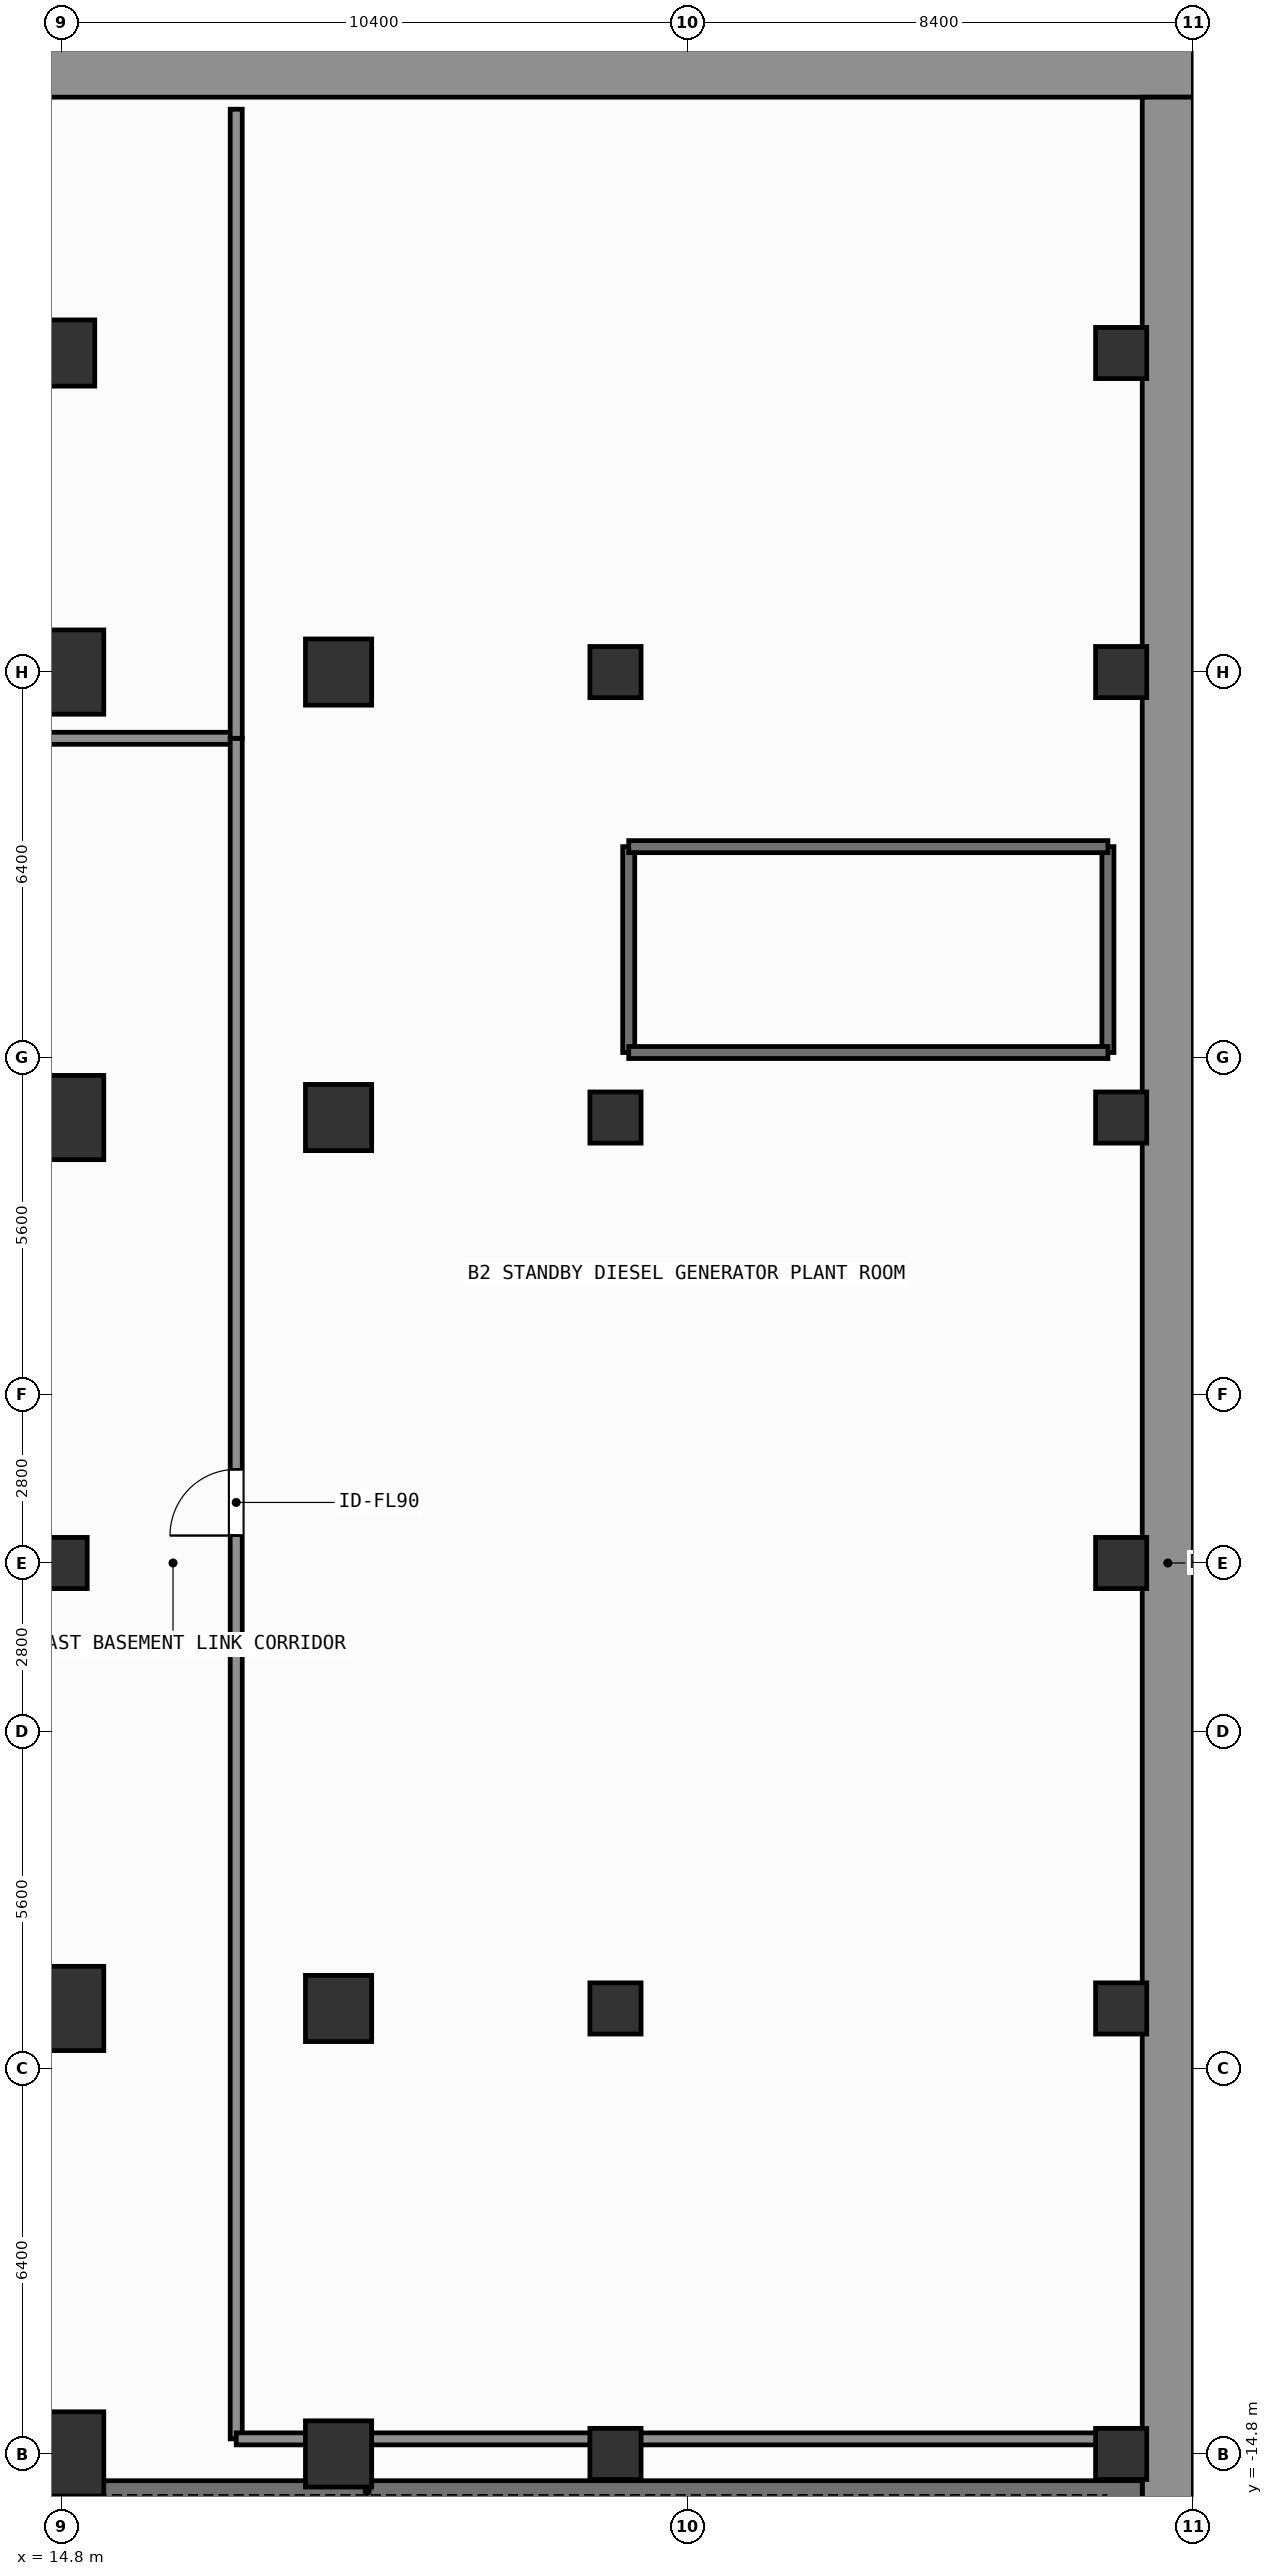
"""IFC4 building model, lengths in metres.
Left out: names, types, materials, properties, quantities, classifications, styles, units other than length and angle.
Written with IfcOpenShell. Run it as: python <this file> out.ifc"""

import sys

from ifc_helpers import new_model, si_unit, direction, frame, frame_2d, origin, origin_2d, place, context, subcontext, project, spatial, rectangle, extrude, element, fill, save


model = new_model("IFC4")
c1 = context("Model", 3, precision=1e-05, world=origin(), true_north=direction((0.0, 1.0)))
c2 = subcontext(c1, "Body", "Model", "MODEL_VIEW")
j1 = project(units=[si_unit("LENGTHUNIT", "METRE"), si_unit("PLANEANGLEUNIT", "RADIAN")], contexts=[c1])
p1 = place(None, origin())
s1 = spatial("IfcSite", under=j1, at=p1, CompositionType="ELEMENT")
p2 = place(p1, origin())
s2 = spatial("IfcBuilding", under=s1, at=p2, CompositionType="ELEMENT")
p3 = place(p2, frame((0.0, 0.0, -8.4)))
s3 = spatial("IfcBuildingStorey", under=s2, at=p3, CompositionType="ELEMENT", Elevation=-8.4)
p4 = place(p3, frame((-33.6, 24.775, 0.0), z_axis=(0.0, 0.0, 1.0), x_axis=(1.0, 0.0, 0.0)))
e1 = element("IfcWall", 1, at=p4, inside=s3, PredefinedType="SOLIDWALL", context=c2, shape_type="SweptSolid", body=[
    extrude(rectangle(XDim=67.2, YDim=0.85, at=frame_2d((33.6, 0.0))), origin(), (0.0, 0.0, 1.0), 4.2),
])
p5 = place(p3, frame((33.175, -24.35, 0.0), z_axis=(0.0, 0.0, 1.0), x_axis=(0.0, 1.0, 0.0)))
e2 = element("IfcWall", 2, at=p5, inside=s3, PredefinedType="SOLIDWALL", context=c2, shape_type="SweptSolid", body=[
    extrude(rectangle(XDim=48.7, YDim=0.85, at=frame_2d((24.35, 0.0))), origin(), (0.0, 0.0, 1.0), 4.2),
])
p6 = place(p3, frame((7.0, -15.42, 0.0), z_axis=(0.0, 0.0, 1.0), x_axis=(1.0, 0.0, 0.0)))
e3 = element("IfcWall", 3, at=p6, inside=s3, PredefinedType="SHEAR", context=c2, shape_type="SweptSolid", body=[
    extrude(rectangle(XDim=25.75, YDim=0.35, at=frame_2d((12.875, 0.0))), origin(), (0.0, 0.0, 1.0), 4.2),
])
for number, where, z_axis, x_axis in (
    (4, (14.8, -14.8, 0.0), (0.0, 0.0, 1.0), (1.0, 0.0, 0.0)),
    (5, (14.8, 14.8, 0.0), (0.0, 0.0, 1.0), (1.0, 0.0, 0.0)),
    (6, (14.8, -7.4, 0.0), (0.0, 0.0, 1.0), (1.0, 0.0, 0.0)),
    (7, (14.8, 7.4, 0.0), (0.0, 0.0, 1.0), (1.0, 0.0, 0.0)),
):
    element("IfcColumn", number, at=place(p3, frame(where, z_axis=z_axis, x_axis=x_axis)), inside=s3, PredefinedType="COLUMN", context=c2, shape_type="SweptSolid", body=[
        extrude(rectangle(XDim=1.4, YDim=1.4, at=origin_2d()), origin(), (0.0, 0.0, 1.0), 4.2),
    ])
for number, where, z_axis, x_axis in (
    (8, (19.4, -14.8, 0.0), (0.0, 0.0, 1.0), (1.0, 0.0, 0.0)),
    (9, (19.4, -7.4, 0.0), (0.0, 0.0, 1.0), (1.0, 0.0, 0.0)),
    (10, (19.4, 7.4, 0.0), (0.0, 0.0, 1.0), (1.0, 0.0, 0.0)),
    (11, (19.4, 14.8, 0.0), (0.0, 0.0, 1.0), (1.0, 0.0, 0.0)),
    (12, (14.8, 20.1, 0.0), (0.0, 0.0, 1.0), (1.0, 0.0, 0.0)),
):
    element("IfcColumn", number, at=place(p3, frame(where, z_axis=z_axis, x_axis=x_axis)), inside=s3, PredefinedType="COLUMN", context=c2, shape_type="SweptSolid", body=[
        extrude(rectangle(XDim=1.1, YDim=1.1, at=origin_2d()), origin(), (0.0, 0.0, 1.0), 4.2),
    ])
for number, where, z_axis, x_axis in (
    (13, (14.8, 0.0, 0.0), (0.0, 0.0, 1.0), (1.0, 0.0, 0.0)),
    (14, (24.0, -14.8, 0.0), (0.0, 0.0, 1.0), (1.0, 0.0, 0.0)),
    (15, (24.0, -7.4, 0.0), (0.0, 0.0, 1.0), (1.0, 0.0, 0.0)),
    (16, (24.0, 7.4, 0.0), (0.0, 0.0, 1.0), (1.0, 0.0, 0.0)),
    (17, (24.0, 14.8, 0.0), (0.0, 0.0, 1.0), (1.0, 0.0, 0.0)),
    (18, (32.4, -14.8, 0.0), (0.0, 0.0, 1.0), (1.0, 0.0, 0.0)),
    (19, (32.4, -7.4, 0.0), (0.0, 0.0, 1.0), (1.0, 0.0, 0.0)),
    (20, (32.4, 0.0, 0.0), (0.0, 0.0, 1.0), (1.0, 0.0, 0.0)),
    (21, (32.4, 7.4, 0.0), (0.0, 0.0, 1.0), (1.0, 0.0, 0.0)),
    (22, (32.4, 14.8, 0.0), (0.0, 0.0, 1.0), (1.0, 0.0, 0.0)),
    (23, (32.4, 20.1, 0.0), (0.0, 0.0, 1.0), (1.0, 0.0, 0.0)),
):
    element("IfcColumn", number, at=place(p3, frame(where, z_axis=z_axis, x_axis=x_axis)), inside=s3, PredefinedType="COLUMN", context=c2, shape_type="SweptSolid", body=[
        extrude(rectangle(XDim=0.85, YDim=0.85, at=origin_2d()), origin(), (0.0, 0.0, 1.0), 4.2),
    ])
for number, where, z_axis, x_axis in (
    (24, (24.22, 8.48, 0.0), (0.0, 0.0, 1.0), (0.0, 1.0, 0.0)),
    (25, (32.18, 11.9, 0.0), (0.0, 0.0, 1.0), (0.0, -1.0, 0.0)),
):
    element("IfcWall", number, at=place(p3, frame(where, z_axis=z_axis, x_axis=x_axis)), inside=s3, PredefinedType="SHEAR", context=c2, shape_type="SweptSolid", body=[
        extrude(rectangle(XDim=3.42, YDim=0.2, at=frame_2d((1.71, 0.0))), origin(), (0.0, 0.0, 1.0), 3.94),
    ])
for number, where, z_axis, x_axis in (
    (26, (32.18, 8.48, 0.0), (0.0, 0.0, 1.0), (-1.0, 0.0, 0.0)),
    (27, (24.22, 11.9, 0.0), (0.0, 0.0, 1.0), (1.0, 0.0, 0.0)),
):
    element("IfcWall", number, at=place(p3, frame(where, z_axis=z_axis, x_axis=x_axis)), inside=s3, PredefinedType="SHEAR", context=c2, shape_type="SweptSolid", body=[
        extrude(rectangle(XDim=7.96, YDim=0.2, at=frame_2d((3.98, 0.0))), origin(), (0.0, 0.0, 1.0), 3.94),
    ])
p7 = place(p3, frame((-13.6, 13.7, 0.0), z_axis=(0.0, 0.0, 1.0), x_axis=(1.0, 0.0, 0.0)))
e28 = element("IfcWall", 28, at=p7, inside=s3, PredefinedType="SOLIDWALL", context=c2, shape_type="SweptSolid", body=[
    extrude(rectangle(XDim=31.3, YDim=0.2, at=frame_2d((15.65, 0.0))), origin(), (0.0, 0.0, 1.0), 3.94),
])
p8 = place(p7, frame((14.38, 0.0, 0.0)))
e29 = element("IfcOpeningElement", 29, at=p8, cuts=e28, PredefinedType="OPENING", context=c2, shape_type="SweptSolid", body=[
    extrude(rectangle(XDim=1.1, YDim=2.15, at=frame_2d((0.55, 1.075))), frame((0.0, 0.11, 0.0), z_axis=(0.0, -1.0, 0.0), x_axis=(1.0, 0.0, 0.0)), (0.0, 0.0, 1.0), 0.22),
])
p9 = place(p3, frame((17.7, -14.55, 0.0), z_axis=(0.0, 0.0, 1.0), x_axis=(0.0, 1.0, 0.0)))
e30 = element("IfcWall", 30, at=p9, inside=s3, PredefinedType="SOLIDWALL", context=c2, shape_type="SweptSolid", body=[
    extrude(rectangle(XDim=28.25, YDim=0.2, at=frame_2d((14.125, 0.0))), origin(), (0.0, 0.0, 1.0), 3.94),
])
p10 = place(p9, frame((15.006, 0.0, 0.0)))
e31 = element("IfcOpeningElement", 31, at=p10, cuts=e30, PredefinedType="OPENING", context=c2, shape_type="SweptSolid", body=[
    extrude(rectangle(XDim=1.1, YDim=2.15, at=frame_2d((0.55, 1.075))), frame((0.0, 0.11, 0.0), z_axis=(0.0, -1.0, 0.0), x_axis=(1.0, 0.0, 0.0)), (0.0, 0.0, 1.0), 0.22),
])
p11 = place(p3, frame((17.7, 13.7, 0.0), z_axis=(0.0, 0.0, 1.0), x_axis=(0.0, 1.0, 0.0)))
e32 = element("IfcWall", 32, at=p11, inside=s3, PredefinedType="SOLIDWALL", context=c2, shape_type="SweptSolid", body=[
    extrude(rectangle(XDim=10.45, YDim=0.2, at=frame_2d((5.225, 0.0))), origin(), (0.0, 0.0, 1.0), 3.94),
])
p12 = place(p3, frame((17.7, -14.55, 0.0), z_axis=(0.0, 0.0, 1.0), x_axis=(1.0, 0.0, 0.0)))
e33 = element("IfcWall", 33, at=p12, inside=s3, PredefinedType="SOLIDWALL", context=c2, shape_type="SweptSolid", body=[
    extrude(rectangle(XDim=14.95, YDim=0.2, at=frame_2d((7.475, 0.0))), origin(), (0.0, 0.0, 1.0), 3.23),
])
p13 = place(p10, origin())
e34 = element("IfcDoor", 34, at=p13, inside=s3, OperationType="SINGLE_SWING_LEFT", PredefinedType="DOOR", context=c2, shape_type="SweptSolid", body=[
    extrude(rectangle(XDim=1.1, YDim=2.15, at=frame_2d((0.55, 1.075))), frame((0.0, 0.025, 0.0), z_axis=(0.0, -1.0, 0.0), x_axis=(1.0, 0.0, 0.0)), (0.0, 0.0, 1.0), 0.05),
])
fill(e31, e34)
save(model, sys.argv[1])
